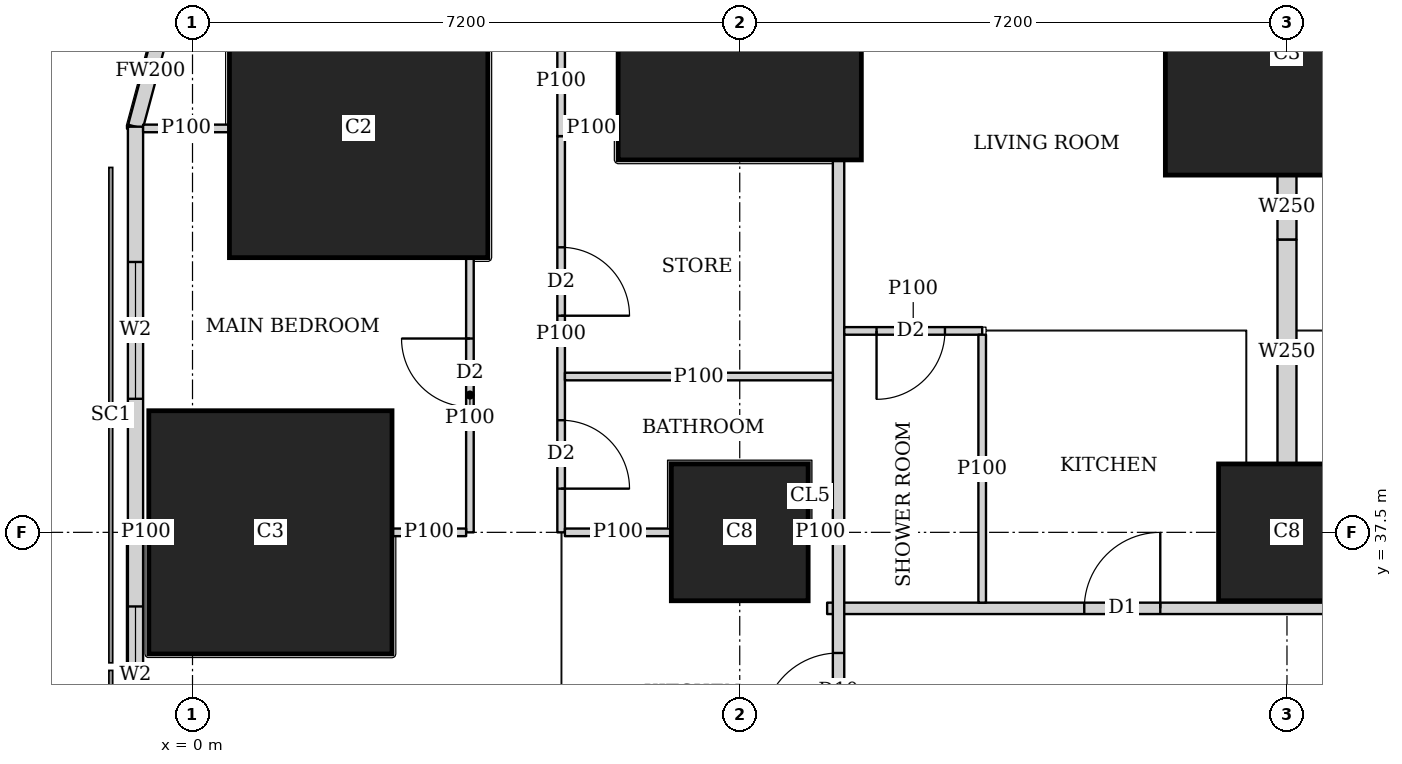
"""IFC4 building model, lengths in metres.
Left out: names, types, materials, properties, quantities, classifications, styles, units other than length and angle.
Written with IfcOpenShell. Run it as: python <this file> out.ifc"""

import sys

from ifc_helpers import new_model, si_unit, direction, frame, frame_2d, origin, origin_2d, place, context, subcontext, project, spatial, rectangle, extrude, element, fill, save


model = new_model("IFC4")
c1 = context("Model", 3, precision=1e-05, world=origin(), true_north=direction((0.0, 1.0)))
c2 = subcontext(c1, "Body", "Model", "MODEL_VIEW")
j1 = project(units=[si_unit("LENGTHUNIT", "METRE"), si_unit("PLANEANGLEUNIT", "RADIAN")], contexts=[c1])
p1 = place(None, origin())
s1 = spatial("IfcSite", under=j1, at=p1, CompositionType="ELEMENT")
p2 = place(p1, origin())
s2 = spatial("IfcBuilding", under=s1, at=p2, CompositionType="ELEMENT")
p3 = place(p2, frame((0.0, 0.0, 23.75)))
s3 = spatial("IfcBuildingStorey", under=s2, at=p3, CompositionType="ELEMENT", Elevation=23.75)
p4 = place(p3, frame((1.025, 37.5, 0.0), z_axis=(0.0, 0.0, 1.0), x_axis=(1.0, 0.0, 0.0)))
e1 = element("IfcColumn", 1, at=p4, inside=s3, PredefinedType="COLUMN", context=c2, shape_type="SweptSolid", body=[
    extrude(rectangle(XDim=3.2, YDim=3.2, at=origin_2d()), origin(), (0.0, 0.0, 1.0), 3.75),
])
for number, where, z_axis, x_axis in (
    (2, (7.2, 37.5, 0.0), (0.0, 0.0, 1.0), (1.0, 0.0, 0.0)),
    (3, (14.4, 37.5, 0.0), (0.0, 0.0, 1.0), (1.0, 0.0, 0.0)),
):
    element("IfcColumn", number, at=place(p3, frame(where, z_axis=z_axis, x_axis=x_axis)), inside=s3, PredefinedType="COLUMN", context=c2, shape_type="SweptSolid", body=[
        extrude(rectangle(XDim=1.8, YDim=1.8, at=origin_2d()), origin(), (0.0, 0.0, 1.0), 3.75),
    ])
p5 = place(p3, frame((2.186, 42.814, 0.0), z_axis=(0.0, 0.0, 1.0), x_axis=(1.0, 0.0, 0.0)))
e4 = element("IfcColumn", 4, at=p5, inside=s3, PredefinedType="COLUMN", context=c2, shape_type="SweptSolid", body=[
    extrude(rectangle(XDim=3.4, YDim=3.4, at=origin_2d()), origin(), (0.0, 0.0, 1.0), 3.75),
])
for number, where, z_axis, x_axis in (
    (5, (7.2, 44.0, 0.0), (0.0, 0.0, 1.0), (1.0, 0.0, 0.0)),
    (6, (14.4, 43.8, 0.0), (0.0, 0.0, 1.0), (1.0, 0.0, 0.0)),
):
    element("IfcColumn", number, at=place(p3, frame(where, z_axis=z_axis, x_axis=x_axis)), inside=s3, PredefinedType="COLUMN", context=c2, shape_type="SweptSolid", body=[
        extrude(rectangle(XDim=3.2, YDim=3.2, at=origin_2d()), origin(), (0.0, 0.0, 1.0), 3.75),
    ])
p6 = place(p3, frame((-0.358, 44.298, 0.0), z_axis=(0.0, 0.0, 1.0), x_axis=(-0.259168954497, -0.965832000415, 0.0)))
e7 = element("IfcWall", 7, at=p6, inside=s3, PredefinedType="SOLIDWALL", context=c2, shape_type="SweptSolid", body=[
    extrude(rectangle(XDim=1.513, YDim=0.2, at=frame_2d((0.756, 0.0))), origin(), (0.0, 0.0, 1.0), 3.5),
])
p7 = place(p3, frame((-0.75, 42.837, 0.0), z_axis=(0.0, 0.0, 1.0), x_axis=(0.0, -1.0, 0.0)))
e8 = element("IfcWall", 8, at=p7, inside=s3, PredefinedType="SOLIDWALL", context=c2, shape_type="SweptSolid", body=[
    extrude(rectangle(XDim=40.674, YDim=0.2, at=frame_2d((20.337, 0.0))), origin(), (0.0, 0.0, 1.0), 3.5),
])
p8 = place(p7, frame((1.78, 0.0, 0.9)))
e9 = element("IfcOpeningElement", 9, at=p8, cuts=e8, PredefinedType="OPENING", context=c2, shape_type="SweptSolid", body=[
    extrude(rectangle(XDim=1.8, YDim=1.5, at=frame_2d((0.9, 0.75))), frame((0.0, 0.11, 0.0), z_axis=(0.0, -1.0, 0.0), x_axis=(1.0, 0.0, 0.0)), (0.0, 0.0, 1.0), 0.22),
])
p9 = place(p7, frame((6.312, 0.0, 0.9)))
e10 = element("IfcOpeningElement", 10, at=p9, cuts=e8, PredefinedType="OPENING", context=c2, shape_type="SweptSolid", body=[
    extrude(rectangle(XDim=1.8, YDim=1.5, at=frame_2d((0.9, 0.75))), frame((0.0, 0.11, 0.0), z_axis=(0.0, -1.0, 0.0), x_axis=(1.0, 0.0, 0.0)), (0.0, 0.0, 1.0), 0.22),
])
p10 = place(p7, frame((10.062, 0.0, 0.9)))
e11 = element("IfcOpeningElement", 11, at=p10, cuts=e8, PredefinedType="OPENING", context=c2, shape_type="SweptSolid", body=[
    extrude(rectangle(XDim=1.8, YDim=1.5, at=frame_2d((0.9, 0.75))), frame((0.0, 0.11, 0.0), z_axis=(0.0, -1.0, 0.0), x_axis=(1.0, 0.0, 0.0)), (0.0, 0.0, 1.0), 0.22),
])
p11 = place(p7, frame((13.812, 0.0, 0.9)))
e12 = element("IfcOpeningElement", 12, at=p11, cuts=e8, PredefinedType="OPENING", context=c2, shape_type="SweptSolid", body=[
    extrude(rectangle(XDim=1.8, YDim=1.5, at=frame_2d((0.9, 0.75))), frame((0.0, 0.11, 0.0), z_axis=(0.0, -1.0, 0.0), x_axis=(1.0, 0.0, 0.0)), (0.0, 0.0, 1.0), 0.22),
])
p12 = place(p7, frame((17.562, 0.0, 0.9)))
e13 = element("IfcOpeningElement", 13, at=p12, cuts=e8, PredefinedType="OPENING", context=c2, shape_type="SweptSolid", body=[
    extrude(rectangle(XDim=1.8, YDim=1.5, at=frame_2d((0.9, 0.75))), frame((0.0, 0.11, 0.0), z_axis=(0.0, -1.0, 0.0), x_axis=(1.0, 0.0, 0.0)), (0.0, 0.0, 1.0), 0.22),
])
p13 = place(p7, frame((21.312, 0.0, 0.9)))
e14 = element("IfcOpeningElement", 14, at=p13, cuts=e8, PredefinedType="OPENING", context=c2, shape_type="SweptSolid", body=[
    extrude(rectangle(XDim=1.8, YDim=1.5, at=frame_2d((0.9, 0.75))), frame((0.0, 0.11, 0.0), z_axis=(0.0, -1.0, 0.0), x_axis=(1.0, 0.0, 0.0)), (0.0, 0.0, 1.0), 0.22),
])
p14 = place(p7, frame((25.062, 0.0, 0.9)))
e15 = element("IfcOpeningElement", 15, at=p14, cuts=e8, PredefinedType="OPENING", context=c2, shape_type="SweptSolid", body=[
    extrude(rectangle(XDim=1.8, YDim=1.5, at=frame_2d((0.9, 0.75))), frame((0.0, 0.11, 0.0), z_axis=(0.0, -1.0, 0.0), x_axis=(1.0, 0.0, 0.0)), (0.0, 0.0, 1.0), 0.22),
])
p15 = place(p7, frame((28.812, 0.0, 0.9)))
e16 = element("IfcOpeningElement", 16, at=p15, cuts=e8, PredefinedType="OPENING", context=c2, shape_type="SweptSolid", body=[
    extrude(rectangle(XDim=1.8, YDim=1.5, at=frame_2d((0.9, 0.75))), frame((0.0, 0.11, 0.0), z_axis=(0.0, -1.0, 0.0), x_axis=(1.0, 0.0, 0.0)), (0.0, 0.0, 1.0), 0.22),
])
p16 = place(p7, frame((32.562, 0.0, 0.9)))
e17 = element("IfcOpeningElement", 17, at=p16, cuts=e8, PredefinedType="OPENING", context=c2, shape_type="SweptSolid", body=[
    extrude(rectangle(XDim=1.8, YDim=1.5, at=frame_2d((0.9, 0.75))), frame((0.0, 0.11, 0.0), z_axis=(0.0, -1.0, 0.0), x_axis=(1.0, 0.0, 0.0)), (0.0, 0.0, 1.0), 0.22),
])
p17 = place(p7, frame((37.094, 0.0, 0.9)))
e18 = element("IfcOpeningElement", 18, at=p17, cuts=e8, PredefinedType="OPENING", context=c2, shape_type="SweptSolid", body=[
    extrude(rectangle(XDim=1.8, YDim=1.5, at=frame_2d((0.9, 0.75))), frame((0.0, 0.11, 0.0), z_axis=(0.0, -1.0, 0.0), x_axis=(1.0, 0.0, 0.0)), (0.0, 0.0, 1.0), 0.22),
])
p18 = place(p3, frame((8.5, 2.626, 0.0), z_axis=(0.0, 0.0, 1.0), x_axis=(0.0, 1.0, 0.0)))
e19 = element("IfcWall", 19, at=p18, inside=s3, PredefinedType="SOLIDWALL", context=c2, shape_type="SweptSolid", body=[
    extrude(rectangle(XDim=39.773, YDim=0.15, at=frame_2d((19.886, 0.0))), origin(), (0.0, 0.0, 1.0), 2.05),
])
p19 = place(p18, frame((9.786, 0.0, 0.0)))
e20 = element("IfcOpeningElement", 20, at=p19, cuts=e19, PredefinedType="OPENING", context=c2, shape_type="SweptSolid", body=[
    extrude(rectangle(XDim=1.0, YDim=2.0, at=frame_2d((0.5, 1.0))), frame((0.0, 0.085, 0.0), z_axis=(0.0, -1.0, 0.0), x_axis=(1.0, 0.0, 0.0)), (0.0, 0.0, 1.0), 0.17),
])
p20 = place(p18, frame((13.961, 0.0, 0.0)))
e21 = element("IfcOpeningElement", 21, at=p20, cuts=e19, PredefinedType="OPENING", context=c2, shape_type="SweptSolid", body=[
    extrude(rectangle(XDim=1.0, YDim=2.0, at=frame_2d((0.5, 1.0))), frame((0.0, 0.085, 0.0), z_axis=(0.0, -1.0, 0.0), x_axis=(1.0, 0.0, 0.0)), (0.0, 0.0, 1.0), 0.17),
])
p21 = place(p18, frame((24.787, 0.0, 0.0)))
e22 = element("IfcOpeningElement", 22, at=p21, cuts=e19, PredefinedType="OPENING", context=c2, shape_type="SweptSolid", body=[
    extrude(rectangle(XDim=1.0, YDim=2.0, at=frame_2d((0.5, 1.0))), frame((0.0, 0.085, 0.0), z_axis=(0.0, -1.0, 0.0), x_axis=(1.0, 0.0, 0.0)), (0.0, 0.0, 1.0), 0.17),
])
p22 = place(p18, frame((32.287, 0.0, 0.0)))
e23 = element("IfcOpeningElement", 23, at=p22, cuts=e19, PredefinedType="OPENING", context=c2, shape_type="SweptSolid", body=[
    extrude(rectangle(XDim=1.0, YDim=2.0, at=frame_2d((0.5, 1.0))), frame((0.0, 0.085, 0.0), z_axis=(0.0, -1.0, 0.0), x_axis=(1.0, 0.0, 0.0)), (0.0, 0.0, 1.0), 0.17),
])
p23 = place(p3, frame((8.35, 36.5, 0.0), z_axis=(0.0, 0.0, 1.0), x_axis=(1.0, 0.0, 0.0)))
e24 = element("IfcWall", 24, at=p23, inside=s3, PredefinedType="SOLIDWALL", context=c2, shape_type="SweptSolid", body=[
    extrude(rectangle(XDim=26.415, YDim=0.15, at=frame_2d((13.208, 0.0))), origin(), (0.0, 0.0, 1.0), 3.5),
])
p24 = place(p23, frame((3.383, 0.0, 0.0)))
e25 = element("IfcOpeningElement", 25, at=p24, cuts=e24, PredefinedType="OPENING", context=c2, shape_type="SweptSolid", body=[
    extrude(rectangle(XDim=1.0, YDim=2.1, at=frame_2d((0.5, 1.05))), frame((0.0, 0.085, 0.0), z_axis=(0.0, -1.0, 0.0), x_axis=(1.0, 0.0, 0.0)), (0.0, 0.0, 1.0), 0.17),
])
p25 = place(p23, frame((7.65, 0.0, 0.0)))
e26 = element("IfcOpeningElement", 26, at=p25, cuts=e24, PredefinedType="OPENING", context=c2, shape_type="SweptSolid", body=[
    extrude(rectangle(XDim=1.0, YDim=2.1, at=frame_2d((0.5, 1.05))), frame((0.0, 0.085, 0.0), z_axis=(0.0, -1.0, 0.0), x_axis=(1.0, 0.0, 0.0)), (0.0, 0.0, 1.0), 0.17),
])
p26 = place(p23, frame((14.857, 0.0, 0.0)))
e27 = element("IfcOpeningElement", 27, at=p26, cuts=e24, PredefinedType="OPENING", context=c2, shape_type="SweptSolid", body=[
    extrude(rectangle(XDim=1.0, YDim=2.1, at=frame_2d((0.5, 1.05))), frame((0.0, 0.085, 0.0), z_axis=(0.0, -1.0, 0.0), x_axis=(1.0, 0.0, 0.0)), (0.0, 0.0, 1.0), 0.17),
])
p27 = place(p3, frame((3.65, 37.5, 0.0), z_axis=(0.0, 0.0, 1.0), x_axis=(0.0, 1.0, 0.0)))
e28 = element("IfcWall", 28, at=p27, inside=s3, PredefinedType="PARTITIONING", context=c2, shape_type="SweptSolid", body=[
    extrude(rectangle(XDim=3.613, YDim=0.1, at=frame_2d((1.807, 0.0))), origin(), (0.0, 0.0, 1.0), 3.5),
])
p28 = place(p27, frame((1.65, 0.0, 0.0)))
e29 = element("IfcOpeningElement", 29, at=p28, cuts=e28, PredefinedType="OPENING", context=c2, shape_type="SweptSolid", body=[
    extrude(rectangle(XDim=0.9, YDim=2.1, at=frame_2d((0.45, 1.05))), frame((0.0, 0.06, 0.0), z_axis=(0.0, -1.0, 0.0), x_axis=(1.0, 0.0, 0.0)), (0.0, 0.0, 1.0), 0.12),
])
p29 = place(p3, frame((4.85, 37.5, 0.0), z_axis=(0.0, 0.0, 1.0), x_axis=(0.0, 1.0, 0.0)))
e30 = element("IfcWall", 30, at=p29, inside=s3, PredefinedType="PARTITIONING", context=c2, shape_type="SweptSolid", body=[
    extrude(rectangle(XDim=5.213, YDim=0.1, at=frame_2d((2.606, 0.0))), origin(), (0.0, 0.0, 1.0), 3.5),
])
p30 = place(p29, frame((0.575, 0.0, 0.0)))
e31 = element("IfcOpeningElement", 31, at=p30, cuts=e30, PredefinedType="OPENING", context=c2, shape_type="SweptSolid", body=[
    extrude(rectangle(XDim=0.9, YDim=2.1, at=frame_2d((0.45, 1.05))), frame((0.0, 0.06, 0.0), z_axis=(0.0, -1.0, 0.0), x_axis=(1.0, 0.0, 0.0)), (0.0, 0.0, 1.0), 0.12),
])
p31 = place(p29, frame((2.85, 0.0, 0.0)))
e32 = element("IfcOpeningElement", 32, at=p31, cuts=e30, PredefinedType="OPENING", context=c2, shape_type="SweptSolid", body=[
    extrude(rectangle(XDim=0.9, YDim=2.1, at=frame_2d((0.45, 1.05))), frame((0.0, 0.06, 0.0), z_axis=(0.0, -1.0, 0.0), x_axis=(1.0, 0.0, 0.0)), (0.0, 0.0, 1.0), 0.12),
])
p32 = place(p3, frame((4.85, 42.713, 0.0), z_axis=(0.0, 0.0, 1.0), x_axis=(0.0, 1.0, 0.0)))
e33 = element("IfcWall", 33, at=p32, inside=s3, PredefinedType="PARTITIONING", context=c2, shape_type="SweptSolid", body=[
    extrude(rectangle(XDim=1.462, YDim=0.1, at=frame_2d((0.731, 0.0))), origin(), (0.0, 0.0, 1.0), 2.1),
])
p33 = place(p3, frame((-0.65, 37.5, 0.0), z_axis=(0.0, 0.0, 1.0), x_axis=(1.0, 0.0, 0.0)))
e34 = element("IfcWall", 34, at=p33, inside=s3, PredefinedType="PARTITIONING", context=c2, shape_type="SweptSolid", body=[
    extrude(rectangle(XDim=0.074, YDim=0.1, at=frame_2d((0.037, 0.0))), origin(), (0.0, 0.0, 1.0), 3.5),
])
p34 = place(p3, frame((2.626, 37.5, 0.0), z_axis=(0.0, 0.0, 1.0), x_axis=(1.0, 0.0, 0.0)))
e35 = element("IfcWall", 35, at=p34, inside=s3, PredefinedType="PARTITIONING", context=c2, shape_type="SweptSolid", body=[
    extrude(rectangle(XDim=0.974, YDim=0.1, at=frame_2d((0.487, 0.0))), origin(), (0.0, 0.0, 1.0), 3.5),
])
p35 = place(p3, frame((-0.65, 42.814, 0.0), z_axis=(0.0, 0.0, 1.0), x_axis=(1.0, 0.0, 0.0)))
e36 = element("IfcWall", 36, at=p35, inside=s3, PredefinedType="PARTITIONING", context=c2, shape_type="SweptSolid", body=[
    extrude(rectangle(XDim=1.135, YDim=0.1, at=frame_2d((0.567, 0.0))), origin(), (0.0, 0.0, 1.0), 3.5),
])
p36 = place(p3, frame((4.9, 37.5, 0.0), z_axis=(0.0, 0.0, 1.0), x_axis=(1.0, 0.0, 0.0)))
e37 = element("IfcWall", 37, at=p36, inside=s3, PredefinedType="PARTITIONING", context=c2, shape_type="SweptSolid", body=[
    extrude(rectangle(XDim=1.399, YDim=0.1, at=frame_2d((0.7, 0.0))), origin(), (0.0, 0.0, 1.0), 3.5),
])
p37 = place(p3, frame((8.101, 37.5, 0.0), z_axis=(0.0, 0.0, 1.0), x_axis=(1.0, 0.0, 0.0)))
e38 = element("IfcWall", 38, at=p37, inside=s3, PredefinedType="PARTITIONING", context=c2, shape_type="SweptSolid", body=[
    extrude(rectangle(XDim=0.324, YDim=0.1, at=frame_2d((0.162, 0.0))), origin(), (0.0, 0.0, 1.0), 3.5),
])
p38 = place(p3, frame((4.9, 42.814, 0.0), z_axis=(0.0, 0.0, 1.0), x_axis=(1.0, 0.0, 0.0)))
e39 = element("IfcWall", 39, at=p38, inside=s3, PredefinedType="PARTITIONING", context=c2, shape_type="SweptSolid", body=[
    extrude(rectangle(XDim=0.699, YDim=0.1, at=frame_2d((0.35, 0.0))), origin(), (0.0, 0.0, 1.0), 2.1),
])
p39 = place(p3, frame((4.9, 39.55, 0.0), z_axis=(0.0, 0.0, 1.0), x_axis=(1.0, 0.0, 0.0)))
e40 = element("IfcWall", 40, at=p39, inside=s3, PredefinedType="PARTITIONING", context=c2, shape_type="SweptSolid", body=[
    extrude(rectangle(XDim=3.525, YDim=0.1, at=frame_2d((1.763, 0.0))), origin(), (0.0, 0.0, 1.0), 3.5),
])
p40 = place(p3, frame((8.575, 40.15, 0.0), z_axis=(0.0, 0.0, 1.0), x_axis=(1.0, 0.0, 0.0)))
e41 = element("IfcWall", 41, at=p40, inside=s3, PredefinedType="PARTITIONING", context=c2, shape_type="SweptSolid", body=[
    extrude(rectangle(XDim=1.815, YDim=0.1, at=frame_2d((0.907, 0.0))), origin(), (0.0, 0.0, 1.0), 3.5),
])
p41 = place(p40, frame((0.425, 0.0, 0.0)))
e42 = element("IfcOpeningElement", 42, at=p41, cuts=e41, PredefinedType="OPENING", context=c2, shape_type="SweptSolid", body=[
    extrude(rectangle(XDim=0.9, YDim=2.1, at=frame_2d((0.45, 1.05))), frame((0.0, 0.06, 0.0), z_axis=(0.0, -1.0, 0.0), x_axis=(1.0, 0.0, 0.0)), (0.0, 0.0, 1.0), 0.12),
])
p42 = place(p3, frame((10.39, 36.575, 0.0), z_axis=(0.0, 0.0, 1.0), x_axis=(0.0, 1.0, 0.0)))
e43 = element("IfcWall", 43, at=p42, inside=s3, PredefinedType="PARTITIONING", context=c2, shape_type="SweptSolid", body=[
    extrude(rectangle(XDim=3.525, YDim=0.1, at=frame_2d((1.763, 0.0))), origin(), (0.0, 0.0, 1.0), 3.5),
])
p43 = place(p3, frame((14.4, 41.35, 0.0), z_axis=(0.0, 0.0, 1.0), x_axis=(0.0, 1.0, 0.0)))
e44 = element("IfcWall", 44, at=p43, inside=s3, PredefinedType="SOLIDWALL", context=c2, shape_type="SweptSolid", body=[
    extrude(rectangle(XDim=0.849, YDim=0.25, at=frame_2d((0.424, 0.0))), origin(), (0.0, 0.0, 1.0), 2.05),
])
p44 = place(p3, frame((14.4, 38.401, 0.0), z_axis=(0.0, 0.0, 1.0), x_axis=(0.0, 1.0, 0.0)))
e45 = element("IfcWall", 45, at=p44, inside=s3, PredefinedType="SOLIDWALL", context=c2, shape_type="SweptSolid", body=[
    extrude(rectangle(XDim=2.949, YDim=0.25, at=frame_2d((1.475, 0.0))), origin(), (0.0, 0.0, 1.0), 3.5),
])
p45 = place(p8, origin())
e46 = element("IfcWindow", 46, at=p45, inside=s3, PartitioningType="SINGLE_PANEL", PredefinedType="WINDOW", context=c2, shape_type="SweptSolid", body=[
    extrude(rectangle(XDim=1.8, YDim=1.5, at=frame_2d((0.9, 0.75))), frame((0.0, 0.03, 0.0), z_axis=(0.0, -1.0, 0.0), x_axis=(1.0, 0.0, 0.0)), (0.0, 0.0, 1.0), 0.06),
])
fill(e9, e46)
p46 = place(p9, origin())
e47 = element("IfcWindow", 47, at=p46, inside=s3, PartitioningType="SINGLE_PANEL", PredefinedType="WINDOW", context=c2, shape_type="SweptSolid", body=[
    extrude(rectangle(XDim=1.8, YDim=1.5, at=frame_2d((0.9, 0.75))), frame((0.0, 0.03, 0.0), z_axis=(0.0, -1.0, 0.0), x_axis=(1.0, 0.0, 0.0)), (0.0, 0.0, 1.0), 0.06),
])
fill(e10, e47)
p47 = place(p28, origin())
e48 = element("IfcDoor", 48, at=p47, inside=s3, OperationType="SINGLE_SWING_RIGHT", PredefinedType="DOOR", context=c2, shape_type="SweptSolid", body=[
    extrude(rectangle(XDim=0.9, YDim=2.1, at=frame_2d((0.45, 1.05))), frame((0.0, 0.025, 0.0), z_axis=(0.0, -1.0, 0.0), x_axis=(1.0, 0.0, 0.0)), (0.0, 0.0, 1.0), 0.05),
])
fill(e29, e48)
p48 = place(p30, origin())
e49 = element("IfcDoor", 49, at=p48, inside=s3, OperationType="SINGLE_SWING_RIGHT", PredefinedType="DOOR", context=c2, shape_type="SweptSolid", body=[
    extrude(rectangle(XDim=0.9, YDim=2.1, at=frame_2d((0.45, 1.05))), frame((0.0, 0.025, 0.0), z_axis=(0.0, -1.0, 0.0), x_axis=(1.0, 0.0, 0.0)), (0.0, 0.0, 1.0), 0.05),
])
fill(e31, e49)
p49 = place(p31, origin())
e50 = element("IfcDoor", 50, at=p49, inside=s3, OperationType="SINGLE_SWING_RIGHT", PredefinedType="DOOR", context=c2, shape_type="SweptSolid", body=[
    extrude(rectangle(XDim=0.9, YDim=2.1, at=frame_2d((0.45, 1.05))), frame((0.0, 0.025, 0.0), z_axis=(0.0, -1.0, 0.0), x_axis=(1.0, 0.0, 0.0)), (0.0, 0.0, 1.0), 0.05),
])
fill(e32, e50)
p50 = place(p22, origin())
e51 = element("IfcDoor", 51, at=p50, inside=s3, OperationType="SINGLE_SWING_LEFT", PredefinedType="DOOR", context=c2, shape_type="SweptSolid", body=[
    extrude(rectangle(XDim=1.0, YDim=2.0, at=frame_2d((0.5, 1.0))), frame((0.0, 0.025, 0.0), z_axis=(0.0, -1.0, 0.0), x_axis=(1.0, 0.0, 0.0)), (0.0, 0.0, 1.0), 0.05),
])
fill(e23, e51)
p51 = place(p41, origin())
e52 = element("IfcDoor", 52, at=p51, inside=s3, OperationType="SINGLE_SWING_RIGHT", PredefinedType="DOOR", context=c2, shape_type="SweptSolid", body=[
    extrude(rectangle(XDim=0.9, YDim=2.1, at=frame_2d((0.45, 1.05))), frame((0.0, 0.025, 0.0), z_axis=(0.0, -1.0, 0.0), x_axis=(1.0, 0.0, 0.0)), (0.0, 0.0, 1.0), 0.05),
])
fill(e42, e52)
p52 = place(p24, origin())
e53 = element("IfcDoor", 53, at=p52, inside=s3, OperationType="SINGLE_SWING_RIGHT", PredefinedType="DOOR", context=c2, shape_type="SweptSolid", body=[
    extrude(rectangle(XDim=1.0, YDim=2.1, at=frame_2d((0.5, 1.05))), frame((0.0, 0.025, 0.0), z_axis=(0.0, -1.0, 0.0), x_axis=(1.0, 0.0, 0.0)), (0.0, 0.0, 1.0), 0.05),
])
fill(e25, e53)
save(model, sys.argv[1])
